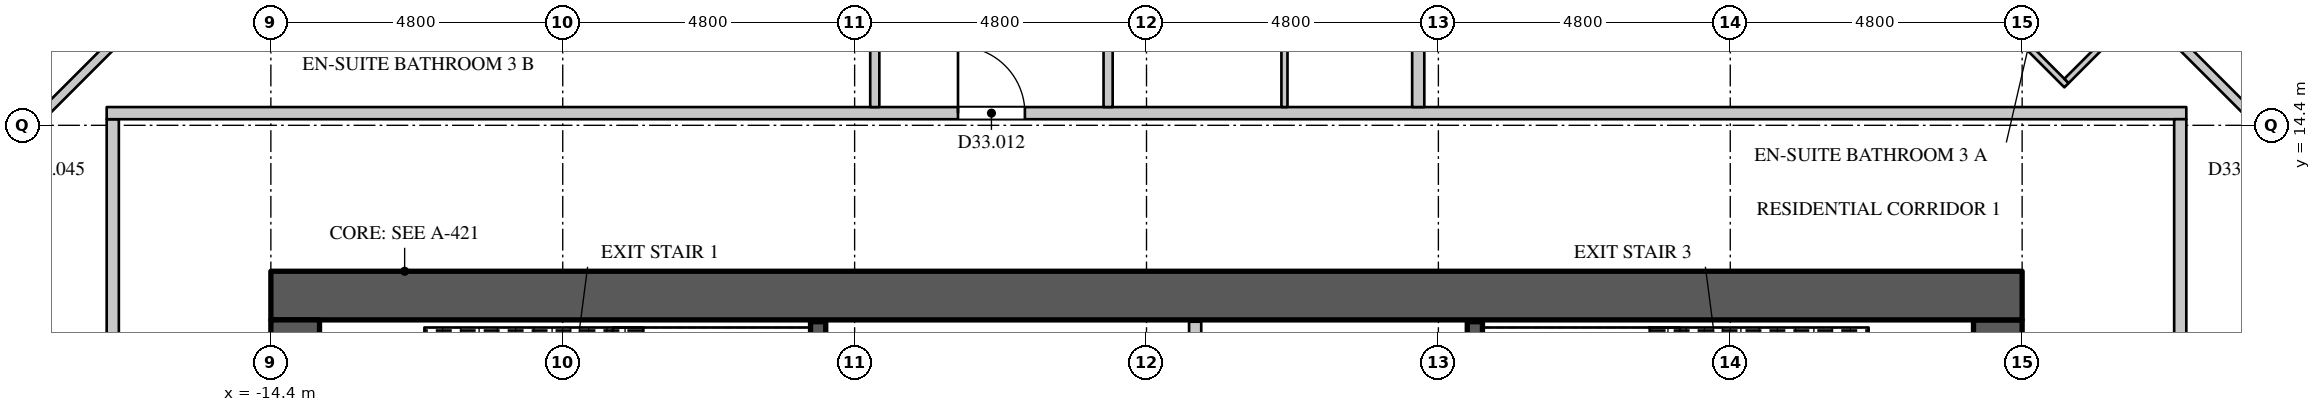
"""IFC4 building model, lengths in metres.
Left out: names, types, materials, properties, quantities, classifications, styles, units other than length and angle.
Written with IfcOpenShell. Run it as: python <this file> out.ifc"""

import sys

from ifc_helpers import new_model, si_unit, direction, frame, frame_2d, origin, place, context, subcontext, project, spatial, rectangle, extrude, element, fill, save


model = new_model("IFC4")
c1 = context("Model", 3, precision=1e-05, world=origin(), true_north=direction((0.0, 1.0)))
c2 = subcontext(c1, "Body", "Model", "MODEL_VIEW")
j1 = project(units=[si_unit("LENGTHUNIT", "METRE"), si_unit("PLANEANGLEUNIT", "RADIAN")], contexts=[c1])
p1 = place(None, origin())
s1 = spatial("IfcSite", under=j1, at=p1, CompositionType="ELEMENT")
p2 = place(p1, origin())
s2 = spatial("IfcBuilding", under=s1, at=p2, CompositionType="ELEMENT")
p3 = place(p2, frame((0.0, 0.0, 144.3)))
s3 = spatial("IfcBuildingStorey", under=s2, at=p3, CompositionType="ELEMENT", Elevation=144.3)
p4 = place(p3, frame((-14.4, 11.6, 0.0), z_axis=(0.0, 0.0, 1.0), x_axis=(1.0, 0.0, 0.0)))
e1 = element("IfcWall", 1, at=p4, inside=s3, PredefinedType="SHEAR", context=c2, shape_type="SweptSolid", body=[
    extrude(rectangle(XDim=28.8, YDim=0.8, at=frame_2d((14.4, 0.0))), origin(), (0.0, 0.0, 1.0), 4.2),
])
p5 = place(p3, frame((14.0, -11.2, 0.0), z_axis=(0.0, 0.0, 1.0), x_axis=(0.0, 1.0, 0.0)))
e2 = element("IfcWall", 2, at=p5, inside=s3, PredefinedType="SHEAR", context=c2, shape_type="SweptSolid", body=[
    extrude(rectangle(XDim=22.4, YDim=0.8, at=frame_2d((11.2, 0.0))), origin(), (0.0, 0.0, 1.0), 4.2),
])
p6 = place(p5, frame((20.25, 0.0, 0.0)))
e3 = element("IfcOpeningElement", 3, at=p6, cuts=e2, PredefinedType="OPENING", context=c2, shape_type="SweptSolid", body=[
    extrude(rectangle(XDim=1.1, YDim=2.2, at=frame_2d((0.55, 1.1))), frame((0.0, 0.41, 0.0), z_axis=(0.0, -1.0, 0.0), x_axis=(1.0, 0.0, 0.0)), (0.0, 0.0, 1.0), 0.82),
])
p7 = place(p5, frame((1.05, 0.0, 0.0)))
e4 = element("IfcOpeningElement", 4, at=p7, cuts=e2, PredefinedType="OPENING", context=c2, shape_type="SweptSolid", body=[
    extrude(rectangle(XDim=1.1, YDim=2.2, at=frame_2d((0.55, 1.1))), frame((0.0, 0.41, 0.0), z_axis=(0.0, -1.0, 0.0), x_axis=(1.0, 0.0, 0.0)), (0.0, 0.0, 1.0), 0.82),
])
p8 = place(p5, frame((14.75, 0.0, 0.0)))
e5 = element("IfcOpeningElement", 5, at=p8, cuts=e2, PredefinedType="OPENING", context=c2, shape_type="SweptSolid", body=[
    extrude(rectangle(XDim=1.5, YDim=2.4, at=frame_2d((0.75, 1.2))), frame((0.0, 0.41, 0.0), z_axis=(0.0, -1.0, 0.0), x_axis=(1.0, 0.0, 0.0)), (0.0, 0.0, 1.0), 0.82),
])
p9 = place(p5, frame((6.15, 0.0, 0.0)))
e6 = element("IfcOpeningElement", 6, at=p9, cuts=e2, PredefinedType="OPENING", context=c2, shape_type="SweptSolid", body=[
    extrude(rectangle(XDim=1.5, YDim=2.4, at=frame_2d((0.75, 1.2))), frame((0.0, 0.41, 0.0), z_axis=(0.0, -1.0, 0.0), x_axis=(1.0, 0.0, 0.0)), (0.0, 0.0, 1.0), 0.82),
])
p10 = place(p3, frame((-14.0, -11.2, 0.0), z_axis=(0.0, 0.0, 1.0), x_axis=(0.0, 1.0, 0.0)))
e7 = element("IfcWall", 7, at=p10, inside=s3, PredefinedType="SHEAR", context=c2, shape_type="SweptSolid", body=[
    extrude(rectangle(XDim=22.4, YDim=0.8, at=frame_2d((11.2, 0.0))), origin(), (0.0, 0.0, 1.0), 4.2),
])
p11 = place(p10, frame((20.25, 0.0, 0.0)))
e8 = element("IfcOpeningElement", 8, at=p11, cuts=e7, PredefinedType="OPENING", context=c2, shape_type="SweptSolid", body=[
    extrude(rectangle(XDim=1.1, YDim=2.2, at=frame_2d((0.55, 1.1))), frame((0.0, 0.41, 0.0), z_axis=(0.0, -1.0, 0.0), x_axis=(1.0, 0.0, 0.0)), (0.0, 0.0, 1.0), 0.82),
])
p12 = place(p10, frame((1.05, 0.0, 0.0)))
e9 = element("IfcOpeningElement", 9, at=p12, cuts=e7, PredefinedType="OPENING", context=c2, shape_type="SweptSolid", body=[
    extrude(rectangle(XDim=1.1, YDim=2.2, at=frame_2d((0.55, 1.1))), frame((0.0, 0.41, 0.0), z_axis=(0.0, -1.0, 0.0), x_axis=(1.0, 0.0, 0.0)), (0.0, 0.0, 1.0), 0.82),
])
p13 = place(p10, frame((15.95, 0.0, 0.0)))
e10 = element("IfcOpeningElement", 10, at=p13, cuts=e7, PredefinedType="OPENING", context=c2, shape_type="SweptSolid", body=[
    extrude(rectangle(XDim=1.5, YDim=2.4, at=frame_2d((0.75, 1.2))), frame((0.0, 0.41, 0.0), z_axis=(0.0, -1.0, 0.0), x_axis=(1.0, 0.0, 0.0)), (0.0, 0.0, 1.0), 0.82),
])
p14 = place(p10, frame((4.95, 0.0, 0.0)))
e11 = element("IfcOpeningElement", 11, at=p14, cuts=e7, PredefinedType="OPENING", context=c2, shape_type="SweptSolid", body=[
    extrude(rectangle(XDim=1.5, YDim=2.4, at=frame_2d((0.75, 1.2))), frame((0.0, 0.41, 0.0), z_axis=(0.0, -1.0, 0.0), x_axis=(1.0, 0.0, 0.0)), (0.0, 0.0, 1.0), 0.82),
])
p15 = place(p3, frame((-17.0, -14.5, 0.0), z_axis=(0.0, 0.0, 1.0), x_axis=(0.0, 1.0, 0.0)))
e12 = element("IfcWall", 12, at=p15, inside=s3, PredefinedType="PARTITIONING", context=c2, shape_type="SweptSolid", body=[
    extrude(rectangle(XDim=29.0, YDim=0.2, at=frame_2d((14.5, 0.0))), origin(), (0.0, 0.0, 1.0), 3.798),
])
p16 = place(p15, frame((13.9, 0.0, 0.0)))
e13 = element("IfcOpeningElement", 13, at=p16, cuts=e12, PredefinedType="OPENING", context=c2, shape_type="SweptSolid", body=[
    extrude(rectangle(XDim=1.1, YDim=2.4, at=frame_2d((0.55, 1.2))), frame((0.0, 0.11, 0.0), z_axis=(0.0, -1.0, 0.0), x_axis=(1.0, 0.0, 0.0)), (0.0, 0.0, 1.0), 0.22),
])
p17 = place(p3, frame((-17.1, 14.6, 0.0), z_axis=(0.0, 0.0, 1.0), x_axis=(1.0, 0.0, 0.0)))
e14 = element("IfcWall", 14, at=p17, inside=s3, PredefinedType="PARTITIONING", context=c2, shape_type="SweptSolid", body=[
    extrude(rectangle(XDim=34.2, YDim=0.2, at=frame_2d((17.1, 0.0))), origin(), (0.0, 0.0, 1.0), 3.798),
])
p18 = place(p17, frame((14.0, 0.0, 0.0)))
e15 = element("IfcOpeningElement", 15, at=p18, cuts=e14, PredefinedType="OPENING", context=c2, shape_type="SweptSolid", body=[
    extrude(rectangle(XDim=1.1, YDim=2.4, at=frame_2d((0.55, 1.2))), frame((0.0, 0.11, 0.0), z_axis=(0.0, -1.0, 0.0), x_axis=(1.0, 0.0, 0.0)), (0.0, 0.0, 1.0), 0.22),
])
p19 = place(p3, frame((17.0, -14.5, 0.0), z_axis=(0.0, 0.0, 1.0), x_axis=(0.0, 1.0, 0.0)))
e16 = element("IfcWall", 16, at=p19, inside=s3, PredefinedType="PARTITIONING", context=c2, shape_type="SweptSolid", body=[
    extrude(rectangle(XDim=29.0, YDim=0.2, at=frame_2d((14.5, 0.0))), origin(), (0.0, 0.0, 1.0), 3.798),
])
p20 = place(p19, frame((15.9, 0.0, 0.0)))
e17 = element("IfcOpeningElement", 17, at=p20, cuts=e16, PredefinedType="OPENING", context=c2, shape_type="SweptSolid", body=[
    extrude(rectangle(XDim=1.1, YDim=2.4, at=frame_2d((0.55, 1.2))), frame((0.0, 0.11, 0.0), z_axis=(0.0, -1.0, 0.0), x_axis=(1.0, 0.0, 0.0)), (0.0, 0.0, 1.0), 0.22),
])
p21 = place(p3, frame((-21.347, 11.388, 0.0), z_axis=(0.0, 0.0, 1.0), x_axis=(0.707106781187, 0.707106781187, 0.0)))
e18 = element("IfcWall", 18, at=p21, inside=s3, PredefinedType="PARTITIONING", context=c2, shape_type="SweptSolid", body=[
    extrude(rectangle(XDim=8.836, YDim=0.15, at=frame_2d((4.418, 0.0))), origin(), (0.0, 0.0, 1.0), 3.798),
])
p22 = place(p21, frame((2.75, 0.0, 0.0)))
e19 = element("IfcOpeningElement", 19, at=p22, cuts=e18, PredefinedType="OPENING", context=c2, shape_type="SweptSolid", body=[
    extrude(rectangle(XDim=0.95, YDim=2.2, at=frame_2d((0.475, 1.1))), frame((0.0, 0.085, 0.0), z_axis=(0.0, -1.0, 0.0), x_axis=(1.0, 0.0, 0.0)), (0.0, 0.0, 1.0), 0.17),
])
p23 = place(p21, frame((7.45, 0.0, 0.0)))
e20 = element("IfcOpeningElement", 20, at=p23, cuts=e18, PredefinedType="OPENING", context=c2, shape_type="SweptSolid", body=[
    extrude(rectangle(XDim=0.95, YDim=2.2, at=frame_2d((0.475, 1.1))), frame((0.0, 0.085, 0.0), z_axis=(0.0, -1.0, 0.0), x_axis=(1.0, 0.0, 0.0)), (0.0, 0.0, 1.0), 0.17),
])
p24 = place(p3, frame((-4.469, 14.7, 0.0), z_axis=(0.0, 0.0, 1.0), x_axis=(0.0, 1.0, 0.0)))
e21 = element("IfcWall", 21, at=p24, inside=s3, PredefinedType="PARTITIONING", context=c2, shape_type="SweptSolid", body=[
    extrude(rectangle(XDim=4.92, YDim=0.15, at=frame_2d((2.46, 0.0))), origin(), (0.0, 0.0, 1.0), 3.15),
])
p25 = place(p24, frame((1.95, 0.0, 0.0)))
e22 = element("IfcOpeningElement", 22, at=p25, cuts=e21, PredefinedType="OPENING", context=c2, shape_type="SweptSolid", body=[
    extrude(rectangle(XDim=0.95, YDim=2.2, at=frame_2d((0.475, 1.1))), frame((0.0, 0.085, 0.0), z_axis=(0.0, -1.0, 0.0), x_axis=(1.0, 0.0, 0.0)), (0.0, 0.0, 1.0), 0.17),
])
p26 = place(p3, frame((-0.631, 14.7, 0.0), z_axis=(0.0, 0.0, 1.0), x_axis=(0.0, 1.0, 0.0)))
e23 = element("IfcWall", 23, at=p26, inside=s3, PredefinedType="PARTITIONING", context=c2, shape_type="SweptSolid", body=[
    extrude(rectangle(XDim=6.025, YDim=0.15, at=frame_2d((3.013, 0.0))), origin(), (0.0, 0.0, 1.0), 3.798),
])
p27 = place(p26, frame((2.5, 0.0, 0.0)))
e24 = element("IfcOpeningElement", 24, at=p27, cuts=e23, PredefinedType="OPENING", context=c2, shape_type="SweptSolid", body=[
    extrude(rectangle(XDim=0.95, YDim=2.2, at=frame_2d((0.475, 1.1))), frame((0.0, 0.085, 0.0), z_axis=(0.0, -1.0, 0.0), x_axis=(1.0, 0.0, 0.0)), (0.0, 0.0, 1.0), 0.17),
])
p28 = place(p3, frame((16.367, 16.367, 0.0), z_axis=(0.0, 0.0, 1.0), x_axis=(0.707106781187, -0.707106781187, 0.0)))
e25 = element("IfcWall", 25, at=p28, inside=s3, PredefinedType="PARTITIONING", context=c2, shape_type="SweptSolid", body=[
    extrude(rectangle(XDim=7.192, YDim=0.15, at=frame_2d((3.596, 0.0))), origin(), (0.0, 0.0, 1.0), 3.798),
])
p29 = place(p28, frame((6.05, 0.0, 0.0)))
e26 = element("IfcOpeningElement", 26, at=p29, cuts=e25, PredefinedType="OPENING", context=c2, shape_type="SweptSolid", body=[
    extrude(rectangle(XDim=0.95, YDim=2.2, at=frame_2d((0.475, 1.1))), frame((0.0, 0.085, 0.0), z_axis=(0.0, -1.0, 0.0), x_axis=(1.0, 0.0, 0.0)), (0.0, 0.0, 1.0), 0.17),
])
p30 = place(p28, frame((3.35, 0.0, 0.0)))
e27 = element("IfcOpeningElement", 27, at=p30, cuts=e25, PredefinedType="OPENING", context=c2, shape_type="SweptSolid", body=[
    extrude(rectangle(XDim=0.95, YDim=2.2, at=frame_2d((0.475, 1.1))), frame((0.0, 0.085, 0.0), z_axis=(0.0, -1.0, 0.0), x_axis=(1.0, 0.0, 0.0)), (0.0, 0.0, 1.0), 0.17),
])
p31 = place(p3, frame((4.469, 14.7, 0.0), z_axis=(0.0, 0.0, 1.0), x_axis=(0.0, 1.0, 0.0)))
e28 = element("IfcWall", 28, at=p31, inside=s3, PredefinedType="PARTITIONING", context=c2, shape_type="SweptSolid", body=[
    extrude(rectangle(XDim=10.95, YDim=0.2, at=frame_2d((5.475, 0.0))), origin(), (0.0, 0.0, 1.0), 3.15),
])
p32 = place(p3, frame((0.8, 5.9, 0.0), z_axis=(0.0, 0.0, 1.0), x_axis=(0.0, 1.0, 0.0)))
e29 = element("IfcWall", 29, at=p32, inside=s3, PredefinedType="PARTITIONING", context=c2, shape_type="SweptSolid", body=[
    extrude(rectangle(XDim=5.27, YDim=0.2, at=frame_2d((2.635, 0.0))), origin(), (0.0, 0.0, 1.0), 3.798),
])
for number, where, z_axis, x_axis in (
    (30, (-5.4, 8.325, 0.0), (0.0, 0.0, 1.0), (0.0, 1.0, 0.0)),
    (31, (5.4, 8.325, 0.0), (0.0, 0.0, 1.0), (0.0, 1.0, 0.0)),
):
    element("IfcWall", number, at=place(p3, frame(where, z_axis=z_axis, x_axis=x_axis)), inside=s3, PredefinedType="SHEAR", context=c2, shape_type="SweptSolid", body=[
        extrude(rectangle(XDim=2.845, YDim=0.25, at=frame_2d((1.422, 0.0))), origin(), (0.0, 0.0, 1.0), 3.798),
    ])
p33 = place(p3, frame((2.269, 14.7, 0.0), z_axis=(0.0, 0.0, 1.0), x_axis=(0.0, 1.0, 0.0)))
e32 = element("IfcWall", 32, at=p33, inside=s3, PredefinedType="PARTITIONING", context=c2, shape_type="SweptSolid", body=[
    extrude(rectangle(XDim=6.025, YDim=0.1, at=frame_2d((3.013, 0.0))), origin(), (0.0, 0.0, 1.0), 3.798),
])
p34 = place(p3, frame((13.15, 17.039, 0.0), z_axis=(0.0, 0.0, 1.0), x_axis=(0.707106781187, -0.707106781187, 0.0)))
e33 = element("IfcWall", 33, at=p34, inside=s3, PredefinedType="PARTITIONING", context=c2, shape_type="SweptSolid", body=[
    extrude(rectangle(XDim=2.8, YDim=0.1, at=frame_2d((1.4, 0.0))), origin(), (0.0, 0.0, 1.0), 3.798),
])
p35 = place(p3, frame((15.13, 15.13, 0.0), z_axis=(0.0, 0.0, 1.0), x_axis=(0.707106781187, 0.707106781187, 0.0)))
e34 = element("IfcWall", 34, at=p35, inside=s3, PredefinedType="PARTITIONING", context=c2, shape_type="SweptSolid", body=[
    extrude(rectangle(XDim=1.73, YDim=0.1, at=frame_2d((0.865, 0.0))), origin(), (0.0, 0.0, 1.0), 3.798),
])
p36 = place(p18, origin())
e35 = element("IfcDoor", 35, at=p36, inside=s3, OperationType="SINGLE_SWING_LEFT", PredefinedType="DOOR", context=c2, shape_type="SweptSolid", body=[
    extrude(rectangle(XDim=1.1, YDim=2.4, at=frame_2d((0.55, 1.2))), frame((0.0, 0.025, 0.0), z_axis=(0.0, -1.0, 0.0), x_axis=(1.0, 0.0, 0.0)), (0.0, 0.0, 1.0), 0.05),
])
fill(e15, e35)
save(model, sys.argv[1])
